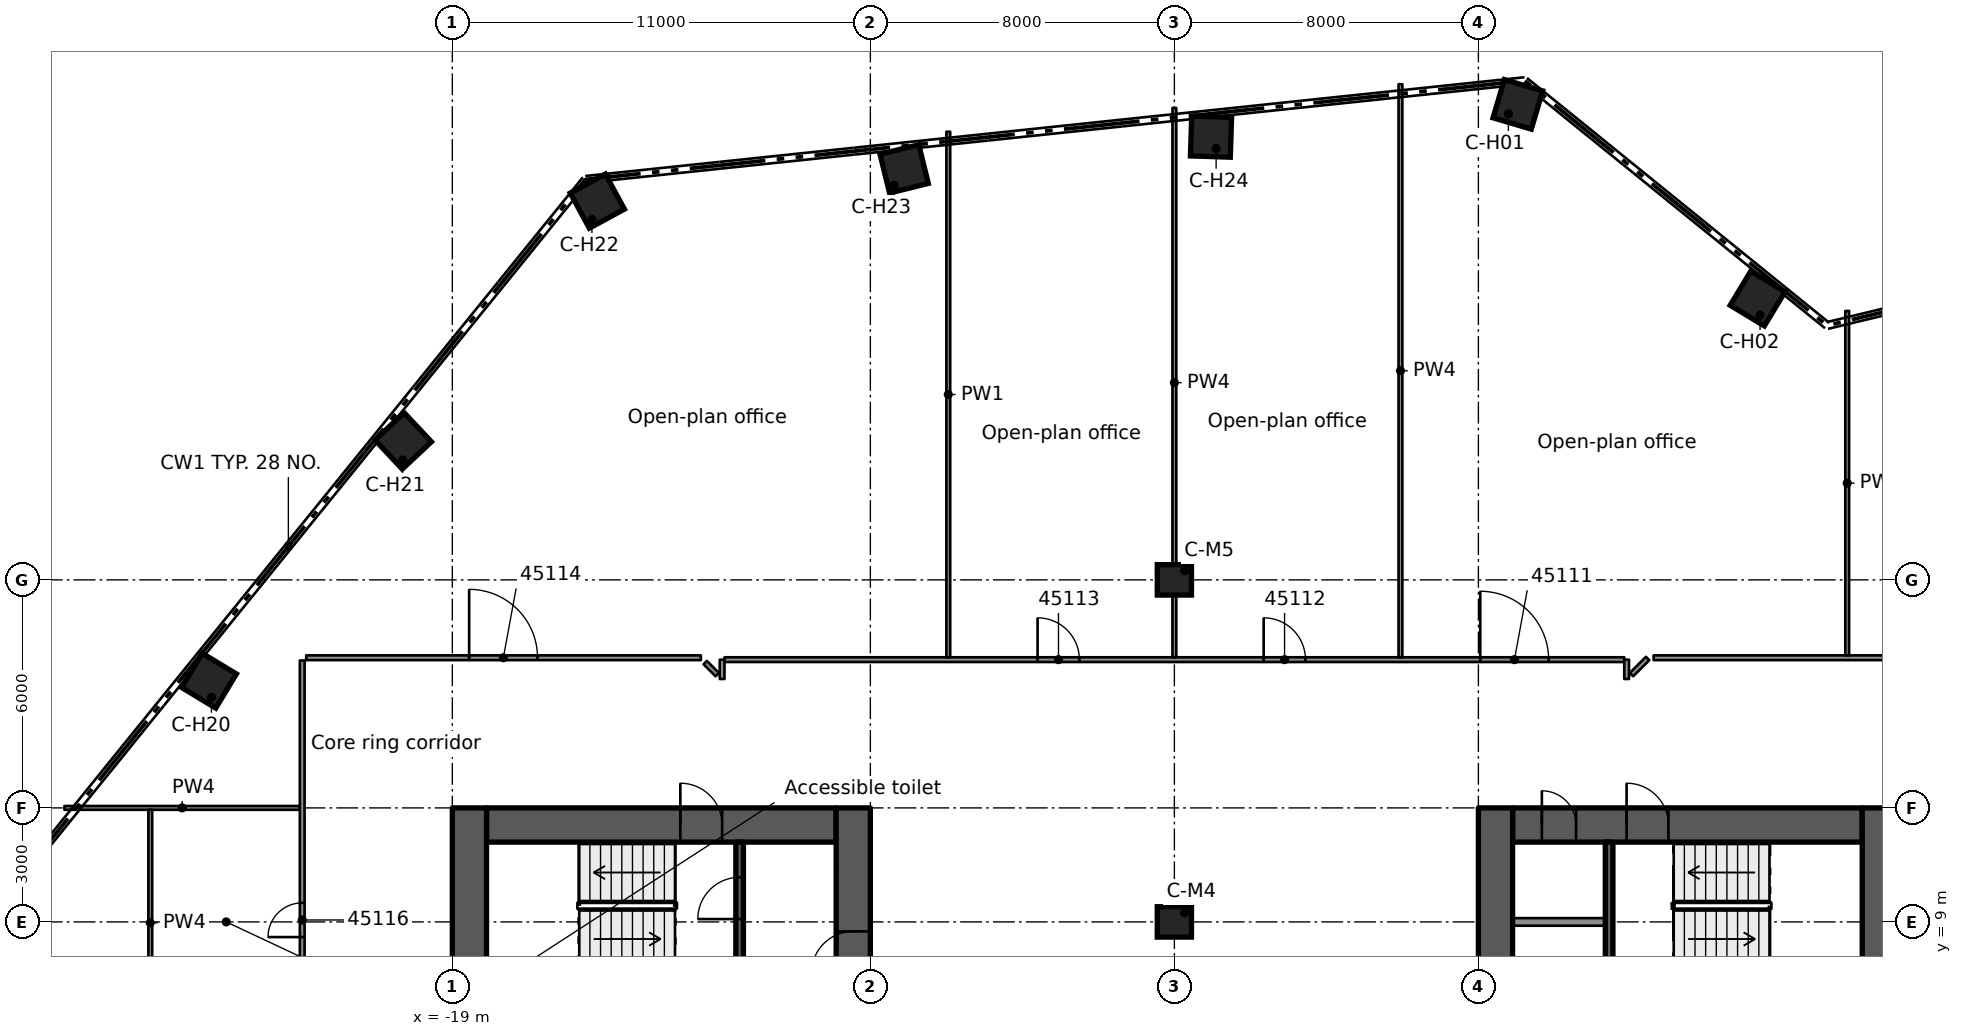
"""IFC4 building model, lengths in metres.
Left out: names, types, materials, properties, quantities, classifications, styles, units other than length and angle.
Written with IfcOpenShell. Run it as: python <this file> out.ifc"""

import sys

from ifc_helpers import new_model, si_unit, direction, frame, frame_2d, origin, origin_2d, place, context, subcontext, project, spatial, rectangle, extrude, element, fill, save


model = new_model("IFC4")
c1 = context("Model", 3, precision=1e-05, world=origin(), true_north=direction((0.0, 1.0)))
c2 = subcontext(c1, "Body", "Model", "MODEL_VIEW")
j1 = project(units=[si_unit("LENGTHUNIT", "METRE"), si_unit("PLANEANGLEUNIT", "RADIAN")], contexts=[c1])
p1 = place(None, origin())
s1 = spatial("IfcSite", under=j1, at=p1, CompositionType="ELEMENT")
p2 = place(p1, origin())
s2 = spatial("IfcBuilding", under=s1, at=p2, CompositionType="ELEMENT")
p3 = place(p2, frame((0.0, 0.0, 221.0)))
s3 = spatial("IfcBuildingStorey", under=s2, at=p3, CompositionType="ELEMENT", Elevation=221.0)
p4 = place(p3, frame((-18.1, 11.55, 0.0), z_axis=(0.0, 0.0, 1.0), x_axis=(1.0, 0.0, 0.0)))
e1 = element("IfcWall", 1, at=p4, inside=s3, PredefinedType="SHEAR", context=c2, shape_type="SweptSolid", body=[
    extrude(rectangle(XDim=9.2, YDim=0.9, at=frame_2d((4.6, 0.0))), origin(), (0.0, 0.0, 1.0), 3.5),
])
p5 = place(p4, frame((5.1, 0.0, 0.0)))
e2 = element("IfcOpeningElement", 2, at=p5, cuts=e1, PredefinedType="OPENING", context=c2, shape_type="SweptSolid", body=[
    extrude(rectangle(XDim=1.1, YDim=2.1, at=frame_2d((0.55, 1.05))), frame((0.0, 0.46, 0.0), z_axis=(0.0, -1.0, 0.0), x_axis=(1.0, 0.0, 0.0)), (0.0, 0.0, 1.0), 0.92),
])
p6 = place(p3, frame((-18.55, -12.0, 0.0), z_axis=(0.0, 0.0, 1.0), x_axis=(0.0, 1.0, 0.0)))
e3 = element("IfcWall", 3, at=p6, inside=s3, PredefinedType="SHEAR", context=c2, shape_type="SweptSolid", body=[
    extrude(rectangle(XDim=24.0, YDim=0.9, at=frame_2d((12.0, 0.0))), origin(), (0.0, 0.0, 1.0), 3.5),
])
p7 = place(p6, frame((10.1, 0.0, 0.0)))
e4 = element("IfcOpeningElement", 4, at=p7, cuts=e3, PredefinedType="OPENING", context=c2, shape_type="SweptSolid", body=[
    extrude(rectangle(XDim=1.8, YDim=2.1, at=frame_2d((0.9, 1.05))), frame((0.0, 0.46, 0.0), z_axis=(0.0, -1.0, 0.0), x_axis=(1.0, 0.0, 0.0)), (0.0, 0.0, 1.0), 0.92),
])
p8 = place(p3, frame((-8.45, -12.0, 0.0), z_axis=(0.0, 0.0, 1.0), x_axis=(0.0, 1.0, 0.0)))
e5 = element("IfcWall", 5, at=p8, inside=s3, PredefinedType="SHEAR", context=c2, shape_type="SweptSolid", body=[
    extrude(rectangle(XDim=24.0, YDim=0.9, at=frame_2d((12.0, 0.0))), origin(), (0.0, 0.0, 1.0), 3.5),
])
p9 = place(p8, frame((9.6, 0.0, 0.0)))
e6 = element("IfcOpeningElement", 6, at=p9, cuts=e5, PredefinedType="OPENING", context=c2, shape_type="SweptSolid", body=[
    extrude(rectangle(XDim=1.8, YDim=2.1, at=frame_2d((0.9, 1.05))), frame((0.0, 0.46, 0.0), z_axis=(0.0, -1.0, 0.0), x_axis=(1.0, 0.0, 0.0)), (0.0, 0.0, 1.0), 0.92),
])
p10 = place(p8, frame((19.65, 0.0, 0.0)))
e7 = element("IfcOpeningElement", 7, at=p10, cuts=e5, PredefinedType="OPENING", context=c2, shape_type="SweptSolid", body=[
    extrude(rectangle(XDim=1.1, YDim=2.1, at=frame_2d((0.55, 1.05))), frame((0.0, 0.46, 0.0), z_axis=(0.0, -1.0, 0.0), x_axis=(1.0, 0.0, 0.0)), (0.0, 0.0, 1.0), 0.92),
])
p11 = place(p3, frame((8.9, 11.55, 0.0), z_axis=(0.0, 0.0, 1.0), x_axis=(1.0, 0.0, 0.0)))
e8 = element("IfcWall", 8, at=p11, inside=s3, PredefinedType="SHEAR", context=c2, shape_type="SweptSolid", body=[
    extrude(rectangle(XDim=9.2, YDim=0.9, at=frame_2d((4.6, 0.0))), origin(), (0.0, 0.0, 1.0), 3.5),
])
p12 = place(p11, frame((3.0, 0.0, 0.0)))
e9 = element("IfcOpeningElement", 9, at=p12, cuts=e8, PredefinedType="OPENING", context=c2, shape_type="SweptSolid", body=[
    extrude(rectangle(XDim=1.1, YDim=2.1, at=frame_2d((0.55, 1.05))), frame((0.0, 0.46, 0.0), z_axis=(0.0, -1.0, 0.0), x_axis=(1.0, 0.0, 0.0)), (0.0, 0.0, 1.0), 0.92),
])
p13 = place(p11, frame((0.77, 0.0, 0.0)))
e10 = element("IfcOpeningElement", 10, at=p13, cuts=e8, PredefinedType="OPENING", context=c2, shape_type="SweptSolid", body=[
    extrude(rectangle(XDim=0.9, YDim=2.1, at=frame_2d((0.45, 1.05))), frame((0.0, 0.46, 0.0), z_axis=(0.0, -1.0, 0.0), x_axis=(1.0, 0.0, 0.0)), (0.0, 0.0, 1.0), 0.92),
])
p14 = place(p3, frame((8.45, -12.0, 0.0), z_axis=(0.0, 0.0, 1.0), x_axis=(0.0, 1.0, 0.0)))
e11 = element("IfcWall", 11, at=p14, inside=s3, PredefinedType="SHEAR", context=c2, shape_type="SweptSolid", body=[
    extrude(rectangle(XDim=24.0, YDim=0.9, at=frame_2d((12.0, 0.0))), origin(), (0.0, 0.0, 1.0), 3.5),
])
p15 = place(p14, frame((12.6, 0.0, 0.0)))
e12 = element("IfcOpeningElement", 12, at=p15, cuts=e11, PredefinedType="OPENING", context=c2, shape_type="SweptSolid", body=[
    extrude(rectangle(XDim=1.8, YDim=2.1, at=frame_2d((0.9, 1.05))), frame((0.0, 0.46, 0.0), z_axis=(0.0, -1.0, 0.0), x_axis=(1.0, 0.0, 0.0)), (0.0, 0.0, 1.0), 0.92),
])
p16 = place(p14, frame((3.25, 0.0, 0.0)))
e13 = element("IfcOpeningElement", 13, at=p16, cuts=e11, PredefinedType="OPENING", context=c2, shape_type="SweptSolid", body=[
    extrude(rectangle(XDim=1.1, YDim=2.1, at=frame_2d((0.55, 1.05))), frame((0.0, 0.46, 0.0), z_axis=(0.0, -1.0, 0.0), x_axis=(1.0, 0.0, 0.0)), (0.0, 0.0, 1.0), 0.92),
])
p17 = place(p3, frame((18.55, -12.0, 0.0), z_axis=(0.0, 0.0, 1.0), x_axis=(0.0, 1.0, 0.0)))
e14 = element("IfcWall", 14, at=p17, inside=s3, PredefinedType="SHEAR", context=c2, shape_type="SweptSolid", body=[
    extrude(rectangle(XDim=24.0, YDim=0.9, at=frame_2d((12.0, 0.0))), origin(), (0.0, 0.0, 1.0), 3.5),
])
p18 = place(p17, frame((12.1, 0.0, 0.0)))
e15 = element("IfcOpeningElement", 15, at=p18, cuts=e14, PredefinedType="OPENING", context=c2, shape_type="SweptSolid", body=[
    extrude(rectangle(XDim=1.8, YDim=2.1, at=frame_2d((0.9, 1.05))), frame((0.0, 0.46, 0.0), z_axis=(0.0, -1.0, 0.0), x_axis=(1.0, 0.0, 0.0)), (0.0, 0.0, 1.0), 0.92),
])
for number, where, z_axis, x_axis in (
    (16, (9.038, 30.512, 0.0), (0.0, 0.0, 1.0), (0.284, 0.959, 0.0)),
    (17, (15.347, 25.403, 0.0), (0.0, 0.0, 1.0), (0.517, 0.856, 0.0)),
    (18, (-25.403, 15.347, 0.0), (0.0, 0.0, 1.0), (-0.856, 0.517, 0.0)),
    (19, (-20.293, 21.657, 0.0), (0.0, 0.0, 1.0), (-0.684, 0.73, 0.0)),
    (20, (-15.184, 27.966, 0.0), (0.0, 0.0, 1.0), (-0.477, 0.879, 0.0)),
    (21, (-7.11, 28.815, 0.0), (0.0, 0.0, 1.0), (-0.24, 0.971, 0.0)),
    (22, (0.964, 29.663, 0.0), (0.0, 0.0, 1.0), (0.032, 0.999, 0.0)),
):
    element("IfcColumn", number, at=place(p3, frame(where, z_axis=z_axis, x_axis=x_axis)), inside=s3, PredefinedType="COLUMN", context=c2, shape_type="SweptSolid", body=[
        extrude(rectangle(XDim=1.05, YDim=1.05, at=origin_2d()), origin(), (0.0, 0.0, 1.0), 3.5),
    ])
for number, where, z_axis, x_axis in (
    (23, (0.0, 9.0, 0.0), (0.0, 0.0, 1.0), (1.0, 0.0, 0.0)),
    (24, (0.0, 18.0, 0.0), (0.0, 0.0, 1.0), (1.0, 0.0, 0.0)),
):
    element("IfcColumn", number, at=place(p3, frame(where, z_axis=z_axis, x_axis=x_axis)), inside=s3, PredefinedType="COLUMN", context=c2, shape_type="SweptSolid", body=[
        extrude(rectangle(XDim=0.9, YDim=0.8, at=origin_2d()), origin(), (0.0, 0.0, 1.0), 3.5),
    ])
p19 = place(p3, frame((-11.44, 6.975, 0.0), z_axis=(0.0, 0.0, 1.0), x_axis=(0.0, 1.0, 0.0)))
e25 = element("IfcWall", 25, at=p19, inside=s3, PredefinedType="SOLIDWALL", context=c2, shape_type="SweptSolid", body=[
    extrude(rectangle(XDim=4.125, YDim=0.2, at=frame_2d((2.062, 0.0))), origin(), (0.0, 0.0, 1.0), 3.08),
])
p20 = place(p19, frame((2.1, 0.0, 0.0)))
e26 = element("IfcOpeningElement", 26, at=p20, cuts=e25, PredefinedType="OPENING", context=c2, shape_type="SweptSolid", body=[
    extrude(rectangle(XDim=1.1, YDim=2.1, at=frame_2d((0.55, 1.05))), frame((0.0, 0.11, 0.0), z_axis=(0.0, -1.0, 0.0), x_axis=(1.0, 0.0, 0.0)), (0.0, 0.0, 1.0), 0.22),
])
p21 = place(p3, frame((11.44, 11.1, 0.0), z_axis=(0.0, 0.0, 1.0), x_axis=(0.0, -1.0, 0.0)))
e27 = element("IfcWall", 27, at=p21, inside=s3, PredefinedType="SOLIDWALL", context=c2, shape_type="SweptSolid", body=[
    extrude(rectangle(XDim=4.125, YDim=0.2, at=frame_2d((2.062, 0.0))), origin(), (0.0, 0.0, 1.0), 3.08),
])
p22 = place(p3, frame((8.9, 9.0, 0.0), z_axis=(0.0, 0.0, 1.0), x_axis=(1.0, 0.0, 0.0)))
e28 = element("IfcWall", 28, at=p22, inside=s3, PredefinedType="PARTITIONING", context=c2, shape_type="SweptSolid", body=[
    extrude(rectangle(XDim=2.44, YDim=0.2, at=frame_2d((1.22, 0.0))), origin(), (0.0, 0.0, 1.0), 3.08),
])
p23 = place(p3, frame((-12.346, 15.824, 0.0), z_axis=(0.0, 0.0, 1.0), x_axis=(0.707106781187, -0.707106781187, 0.0)))
e29 = element("IfcWall", 29, at=p23, inside=s3, PredefinedType="PARTITIONING", context=c2, shape_type="SweptSolid", body=[
    extrude(rectangle(XDim=0.448, YDim=0.125, at=frame_2d((0.224, 0.0))), origin(), (0.0, 0.0, 1.0), 3.06),
])
p24 = place(p3, frame((-29.207, 12.0, 0.0), z_axis=(0.0, 0.0, 1.0), x_axis=(1.0, 0.0, 0.0)))
e30 = element("IfcWall", 30, at=p24, inside=s3, PredefinedType="PARTITIONING", context=c2, shape_type="SweptSolid", body=[
    extrude(rectangle(XDim=6.195, YDim=0.1, at=frame_2d((3.098, 0.0))), origin(), (0.0, 0.0, 1.0), 2.449),
])
p25 = place(p3, frame((-11.838, 15.901, 0.0), z_axis=(0.0, 0.0, 1.0), x_axis=(1.0, 0.0, 0.0)))
e31 = element("IfcWall", 31, at=p25, inside=s3, PredefinedType="PARTITIONING", context=c2, shape_type="SweptSolid", body=[
    extrude(rectangle(XDim=23.676, YDim=0.125, at=frame_2d((11.838, 0.0))), origin(), (0.0, 0.0, 1.0), 3.06),
])
p26 = place(p25, frame((19.886, 0.0, 0.0)))
e32 = element("IfcOpeningElement", 32, at=p26, cuts=e31, PredefinedType="OPENING", context=c2, shape_type="SweptSolid", body=[
    extrude(rectangle(XDim=1.8, YDim=2.1, at=frame_2d((0.9, 1.05))), frame((0.0, 0.073, 0.0), z_axis=(0.0, -1.0, 0.0), x_axis=(1.0, 0.0, 0.0)), (0.0, 0.0, 1.0), 0.145),
])
p27 = place(p25, frame((14.188, 0.0, 0.0)))
e33 = element("IfcOpeningElement", 33, at=p27, cuts=e31, PredefinedType="OPENING", context=c2, shape_type="SweptSolid", body=[
    extrude(rectangle(XDim=1.1, YDim=2.1, at=frame_2d((0.55, 1.05))), frame((0.0, 0.073, 0.0), z_axis=(0.0, -1.0, 0.0), x_axis=(1.0, 0.0, 0.0)), (0.0, 0.0, 1.0), 0.145),
])
p28 = place(p25, frame((8.239, 0.0, 0.0)))
e34 = element("IfcOpeningElement", 34, at=p28, cuts=e31, PredefinedType="OPENING", context=c2, shape_type="SweptSolid", body=[
    extrude(rectangle(XDim=1.1, YDim=2.1, at=frame_2d((0.55, 1.05))), frame((0.0, 0.073, 0.0), z_axis=(0.0, -1.0, 0.0), x_axis=(1.0, 0.0, 0.0)), (0.0, 0.0, 1.0), 0.145),
])
p29 = place(p3, frame((-22.845, 15.951, 0.0), z_axis=(0.0, 0.0, 1.0), x_axis=(1.0, 0.0, 0.0)))
e35 = element("IfcWall", 35, at=p29, inside=s3, PredefinedType="PARTITIONING", context=c2, shape_type="SweptSolid", body=[
    extrude(rectangle(XDim=10.385, YDim=0.125, at=frame_2d((5.192, 0.0))), origin(), (0.0, 0.0, 1.0), 3.06),
])
p30 = place(p29, frame((4.288, 0.0, 0.0)))
e36 = element("IfcOpeningElement", 36, at=p30, cuts=e35, PredefinedType="OPENING", context=c2, shape_type="SweptSolid", body=[
    extrude(rectangle(XDim=1.8, YDim=2.1, at=frame_2d((0.9, 1.05))), frame((0.0, 0.073, 0.0), z_axis=(0.0, -1.0, 0.0), x_axis=(1.0, 0.0, 0.0)), (0.0, 0.0, 1.0), 0.145),
])
p31 = place(p3, frame((12.611, 15.951, 0.0), z_axis=(0.0, 0.0, 1.0), x_axis=(1.0, 0.0, 0.0)))
e37 = element("IfcWall", 37, at=p31, inside=s3, PredefinedType="PARTITIONING", context=c2, shape_type="SweptSolid", body=[
    extrude(rectangle(XDim=10.276, YDim=0.125, at=frame_2d((5.138, 0.0))), origin(), (0.0, 0.0, 1.0), 3.06),
])
p32 = place(p3, frame((12.029, 15.507, 0.0), z_axis=(0.0, 0.0, 1.0), x_axis=(0.707106781187, 0.707106781187, 0.0)))
e38 = element("IfcWall", 38, at=p32, inside=s3, PredefinedType="PARTITIONING", context=c2, shape_type="SweptSolid", body=[
    extrude(rectangle(XDim=0.599, YDim=0.125, at=frame_2d((0.3, 0.0))), origin(), (0.0, 0.0, 1.0), 3.06),
])
p33 = place(p3, frame((17.705, 16.014, 0.0), z_axis=(0.0, 0.0, 1.0), x_axis=(0.0, 1.0, 0.0)))
e39 = element("IfcWall", 39, at=p33, inside=s3, PredefinedType="PARTITIONING", context=c2, shape_type="SweptSolid", body=[
    extrude(rectangle(XDim=9.062, YDim=0.1, at=frame_2d((4.531, 0.0))), origin(), (0.0, 0.0, 1.0), 3.06),
])
p34 = place(p3, frame((11.901, 15.392, 0.0), z_axis=(0.0, 0.0, 1.0), x_axis=(0.0, 1.0, 0.0)))
e40 = element("IfcWall", 40, at=p34, inside=s3, PredefinedType="PARTITIONING", context=c2, shape_type="SweptSolid", body=[
    extrude(rectangle(XDim=0.508, YDim=0.125, at=frame_2d((0.254, 0.0))), origin(), (0.0, 0.0, 1.0), 3.06),
])
p35 = place(p3, frame((5.949, 15.963, 0.0), z_axis=(0.0, 0.0, 1.0), x_axis=(0.0, 1.0, 0.0)))
e41 = element("IfcWall", 41, at=p35, inside=s3, PredefinedType="PARTITIONING", context=c2, shape_type="SweptSolid", body=[
    extrude(rectangle(XDim=15.079, YDim=0.1, at=frame_2d((7.54, 0.0))), origin(), (0.0, 0.0, 1.0), 2.449),
])
p36 = place(p3, frame((0.0, 15.963, 0.0), z_axis=(0.0, 0.0, 1.0), x_axis=(0.0, 1.0, 0.0)))
e42 = element("IfcWall", 42, at=p36, inside=s3, PredefinedType="PARTITIONING", context=c2, shape_type="SweptSolid", body=[
    extrude(rectangle(XDim=14.454, YDim=0.1, at=frame_2d((7.227, 0.0))), origin(), (0.0, 0.0, 1.0), 2.449),
])
p37 = place(p3, frame((-5.949, 15.963, 0.0), z_axis=(0.0, 0.0, 1.0), x_axis=(0.0, 1.0, 0.0)))
e43 = element("IfcWall", 43, at=p37, inside=s3, PredefinedType="PARTITIONING", context=c2, shape_type="SweptSolid", body=[
    extrude(rectangle(XDim=13.829, YDim=0.1, at=frame_2d((6.915, 0.0))), origin(), (0.0, 0.0, 1.0), 3.06),
])
p38 = place(p3, frame((-11.901, 15.392, 0.0), z_axis=(0.0, 0.0, 1.0), x_axis=(0.0, 1.0, 0.0)))
e44 = element("IfcWall", 44, at=p38, inside=s3, PredefinedType="PARTITIONING", context=c2, shape_type="SweptSolid", body=[
    extrude(rectangle(XDim=0.508, YDim=0.125, at=frame_2d((0.254, 0.0))), origin(), (0.0, 0.0, 1.0), 3.06),
])
p39 = place(p3, frame((-22.95, -15.951, 0.0), z_axis=(0.0, 0.0, 1.0), x_axis=(0.0, 1.0, 0.0)))
e45 = element("IfcWall", 45, at=p39, inside=s3, PredefinedType="PARTITIONING", context=c2, shape_type="SweptSolid", body=[
    extrude(rectangle(XDim=31.829, YDim=0.125, at=frame_2d((15.915, 0.0))), origin(), (0.0, 0.0, 1.0), 3.06),
])
p40 = place(p39, frame((1.35, 0.0, 0.0)))
e46 = element("IfcOpeningElement", 46, at=p40, cuts=e45, PredefinedType="OPENING", context=c2, shape_type="SweptSolid", body=[
    extrude(rectangle(XDim=1.1, YDim=2.1, at=frame_2d((0.55, 1.05))), frame((0.0, 0.073, 0.0), z_axis=(0.0, -1.0, 0.0), x_axis=(1.0, 0.0, 0.0)), (0.0, 0.0, 1.0), 0.145),
])
p41 = place(p39, frame((9.051, 0.0, 0.0)))
e47 = element("IfcOpeningElement", 47, at=p41, cuts=e45, PredefinedType="OPENING", context=c2, shape_type="SweptSolid", body=[
    extrude(rectangle(XDim=1.8, YDim=2.1, at=frame_2d((0.9, 1.05))), frame((0.0, 0.073, 0.0), z_axis=(0.0, -1.0, 0.0), x_axis=(1.0, 0.0, 0.0)), (0.0, 0.0, 1.0), 0.145),
])
p42 = place(p39, frame((24.552, 0.0, 0.0)))
e48 = element("IfcOpeningElement", 48, at=p42, cuts=e45, PredefinedType="OPENING", context=c2, shape_type="SweptSolid", body=[
    extrude(rectangle(XDim=0.9, YDim=2.1, at=frame_2d((0.45, 1.05))), frame((0.0, 0.073, 0.0), z_axis=(0.0, -1.0, 0.0), x_axis=(1.0, 0.0, 0.0)), (0.0, 0.0, 1.0), 0.145),
])
p43 = place(p39, frame((18.303, 0.0, 0.0)))
e49 = element("IfcOpeningElement", 49, at=p43, cuts=e45, PredefinedType="OPENING", context=c2, shape_type="SweptSolid", body=[
    extrude(rectangle(XDim=1.1, YDim=2.1, at=frame_2d((0.55, 1.05))), frame((0.0, 0.073, 0.0), z_axis=(0.0, -1.0, 0.0), x_axis=(1.0, 0.0, 0.0)), (0.0, 0.0, 1.0), 0.145),
])
p44 = place(p3, frame((-26.948, 6.001, 0.0), z_axis=(0.0, 0.0, 1.0), x_axis=(0.0, 1.0, 0.0)))
e50 = element("IfcWall", 50, at=p44, inside=s3, PredefinedType="PARTITIONING", context=c2, shape_type="SweptSolid", body=[
    extrude(rectangle(XDim=5.949, YDim=0.1, at=frame_2d((2.975, 0.0))), origin(), (0.0, 0.0, 1.0), 2.449),
])
p45 = place(p10, origin())
e51 = element("IfcDoor", 51, at=p45, inside=s3, OperationType="SINGLE_SWING_RIGHT", PredefinedType="DOOR", context=c2, shape_type="SweptSolid", body=[
    extrude(rectangle(XDim=1.1, YDim=2.1, at=frame_2d((0.55, 1.05))), frame((0.0, 0.025, 0.0), z_axis=(0.0, -1.0, 0.0), x_axis=(1.0, 0.0, 0.0)), (0.0, 0.0, 1.0), 0.05),
])
fill(e7, e51)
p46 = place(p5, origin())
e52 = element("IfcDoor", 52, at=p46, inside=s3, OperationType="SINGLE_SWING_RIGHT", PredefinedType="DOOR", context=c2, shape_type="SweptSolid", body=[
    extrude(rectangle(XDim=1.1, YDim=2.1, at=frame_2d((0.55, 1.05))), frame((0.0, 0.025, 0.0), z_axis=(0.0, -1.0, 0.0), x_axis=(1.0, 0.0, 0.0)), (0.0, 0.0, 1.0), 0.05),
])
fill(e2, e52)
p47 = place(p20, origin())
e53 = element("IfcDoor", 53, at=p47, inside=s3, OperationType="SINGLE_SWING_RIGHT", PredefinedType="DOOR", context=c2, shape_type="SweptSolid", body=[
    extrude(rectangle(XDim=1.1, YDim=2.1, at=frame_2d((0.55, 1.05))), frame((0.0, 0.025, 0.0), z_axis=(0.0, -1.0, 0.0), x_axis=(1.0, 0.0, 0.0)), (0.0, 0.0, 1.0), 0.05),
])
fill(e26, e53)
p48 = place(p12, origin())
e54 = element("IfcDoor", 54, at=p48, inside=s3, OperationType="SINGLE_SWING_LEFT", PredefinedType="DOOR", context=c2, shape_type="SweptSolid", body=[
    extrude(rectangle(XDim=1.1, YDim=2.1, at=frame_2d((0.55, 1.05))), frame((0.0, 0.025, 0.0), z_axis=(0.0, -1.0, 0.0), x_axis=(1.0, 0.0, 0.0)), (0.0, 0.0, 1.0), 0.05),
])
fill(e9, e54)
p49 = place(p13, origin())
e55 = element("IfcDoor", 55, at=p49, inside=s3, OperationType="SINGLE_SWING_LEFT", PredefinedType="DOOR", context=c2, shape_type="SweptSolid", body=[
    extrude(rectangle(XDim=0.9, YDim=2.1, at=frame_2d((0.45, 1.05))), frame((0.0, 0.025, 0.0), z_axis=(0.0, -1.0, 0.0), x_axis=(1.0, 0.0, 0.0)), (0.0, 0.0, 1.0), 0.05),
])
fill(e10, e55)
p50 = place(p26, origin())
e56 = element("IfcDoor", 56, at=p50, inside=s3, OperationType="DOUBLE_DOOR_SINGLE_SWING", PredefinedType="DOOR", context=c2, shape_type="SweptSolid", body=[
    extrude(rectangle(XDim=1.8, YDim=2.1, at=frame_2d((0.9, 1.05))), frame((0.0, 0.025, 0.0), z_axis=(0.0, -1.0, 0.0), x_axis=(1.0, 0.0, 0.0)), (0.0, 0.0, 1.0), 0.05),
])
fill(e32, e56)
p51 = place(p27, origin())
e57 = element("IfcDoor", 57, at=p51, inside=s3, OperationType="SINGLE_SWING_RIGHT", PredefinedType="DOOR", context=c2, shape_type="SweptSolid", body=[
    extrude(rectangle(XDim=1.1, YDim=2.1, at=frame_2d((0.55, 1.05))), frame((0.0, 0.025, 0.0), z_axis=(0.0, -1.0, 0.0), x_axis=(1.0, 0.0, 0.0)), (0.0, 0.0, 1.0), 0.05),
])
fill(e33, e57)
p52 = place(p28, origin())
e58 = element("IfcDoor", 58, at=p52, inside=s3, OperationType="SINGLE_SWING_LEFT", PredefinedType="DOOR", context=c2, shape_type="SweptSolid", body=[
    extrude(rectangle(XDim=1.1, YDim=2.1, at=frame_2d((0.55, 1.05))), frame((0.0, 0.025, 0.0), z_axis=(0.0, -1.0, 0.0), x_axis=(1.0, 0.0, 0.0)), (0.0, 0.0, 1.0), 0.05),
])
fill(e34, e58)
p53 = place(p30, origin())
e59 = element("IfcDoor", 59, at=p53, inside=s3, OperationType="DOUBLE_DOOR_SINGLE_SWING", PredefinedType="DOOR", context=c2, shape_type="SweptSolid", body=[
    extrude(rectangle(XDim=1.8, YDim=2.1, at=frame_2d((0.9, 1.05))), frame((0.0, 0.025, 0.0), z_axis=(0.0, -1.0, 0.0), x_axis=(1.0, 0.0, 0.0)), (0.0, 0.0, 1.0), 0.05),
])
fill(e36, e59)
p54 = place(p42, origin())
e60 = element("IfcDoor", 60, at=p54, inside=s3, OperationType="SINGLE_SWING_RIGHT", PredefinedType="DOOR", context=c2, shape_type="SweptSolid", body=[
    extrude(rectangle(XDim=0.9, YDim=2.1, at=frame_2d((0.45, 1.05))), frame((0.0, 0.025, 0.0), z_axis=(0.0, -1.0, 0.0), x_axis=(1.0, 0.0, 0.0)), (0.0, 0.0, 1.0), 0.05),
])
fill(e48, e60)
save(model, sys.argv[1])
